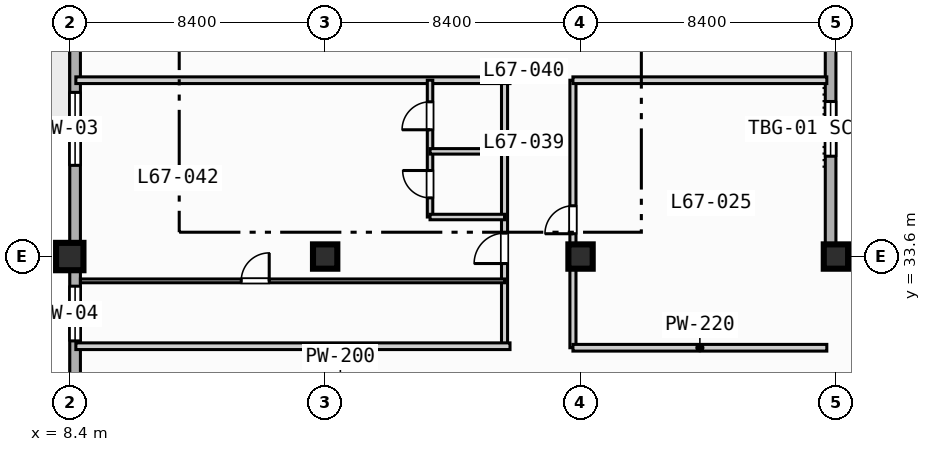
"""IFC4 building model, lengths in metres.
Left out: names, types, materials, properties, quantities, classifications, styles, units other than length and angle.
Written with IfcOpenShell. Run it as: python <this file> out.ifc"""

import sys

from ifc_helpers import new_model, si_unit, direction, frame, frame_2d, origin, origin_2d, place, context, subcontext, project, spatial, rectangle, extrude, element, fill, save


model = new_model("IFC4")
c1 = context("Model", 3, precision=1e-05, world=origin(), true_north=direction((0.0, 1.0)))
c2 = subcontext(c1, "Body", "Model", "MODEL_VIEW")
j1 = project(units=[si_unit("LENGTHUNIT", "METRE"), si_unit("PLANEANGLEUNIT", "RADIAN")], contexts=[c1])
p1 = place(None, origin())
s1 = spatial("IfcSite", under=j1, at=p1, CompositionType="ELEMENT")
p2 = place(p1, origin())
s2 = spatial("IfcBuilding", under=s1, at=p2, CompositionType="ELEMENT")
p3 = place(p2, frame((0.0, 0.0, 271.2)))
s3 = spatial("IfcBuildingStorey", under=s2, at=p3, CompositionType="ELEMENT", Elevation=271.2)
p4 = place(p3, frame((8.4, 33.6, 0.0), z_axis=(0.0, 0.0, 1.0), x_axis=(1.0, 0.0, 0.0)))
e1 = element("IfcColumn", 1, at=p4, inside=s3, PredefinedType="COLUMN", context=c2, shape_type="SweptSolid", body=[
    extrude(rectangle(XDim=0.9, YDim=0.9, at=origin_2d()), origin(), (0.0, 0.0, 1.0), 3.7),
])
for number, where, z_axis, x_axis in (
    (2, (16.8, 33.6, 0.0), (0.0, 0.0, 1.0), (1.0, 0.0, 0.0)),
    (3, (25.2, 33.6, 0.0), (0.0, 0.0, 1.0), (1.0, 0.0, 0.0)),
    (4, (33.6, 33.6, 0.0), (0.0, 0.0, 1.0), (1.0, 0.0, 0.0)),
):
    element("IfcColumn", number, at=place(p3, frame(where, z_axis=z_axis, x_axis=x_axis)), inside=s3, PredefinedType="COLUMN", context=c2, shape_type="SweptSolid", body=[
        extrude(rectangle(XDim=0.8, YDim=0.8, at=origin_2d()), origin(), (0.0, 0.0, 1.0), 3.7),
    ])
p5 = place(p3, frame((8.575, 11.575, 0.0), z_axis=(0.0, 0.0, 1.0), x_axis=(0.0, 1.0, 0.0)))
e5 = element("IfcWall", 5, at=p5, inside=s3, PredefinedType="STANDARD", context=c2, shape_type="SweptSolid", body=[
    extrude(rectangle(XDim=60.85, YDim=0.35, at=frame_2d((30.425, 0.0))), origin(), (0.0, 0.0, 1.0), 3.47),
])
p6 = place(p5, frame((33.925, 0.0, 0.0)))
e6 = element("IfcOpeningElement", 6, at=p6, cuts=e5, PredefinedType="OPENING", context=c2, shape_type="SweptSolid", body=[
    extrude(rectangle(XDim=1.4, YDim=2.2, at=frame_2d((0.7, 1.1))), frame((0.0, 0.185, 0.0), z_axis=(0.0, -1.0, 0.0), x_axis=(1.0, 0.0, 0.0)), (0.0, 0.0, 1.0), 0.37),
])
p7 = place(p5, frame((25.025, 0.0, 0.85)))
e7 = element("IfcOpeningElement", 7, at=p7, cuts=e5, PredefinedType="OPENING", context=c2, shape_type="SweptSolid", body=[
    extrude(rectangle(XDim=2.4, YDim=1.95, at=frame_2d((1.2, 0.975))), frame((0.0, 0.185, 0.0), z_axis=(0.0, -1.0, 0.0), x_axis=(1.0, 0.0, 0.0)), (0.0, 0.0, 1.0), 0.37),
])
p8 = place(p5, frame((41.825, 0.0, 0.85)))
e8 = element("IfcOpeningElement", 8, at=p8, cuts=e5, PredefinedType="OPENING", context=c2, shape_type="SweptSolid", body=[
    extrude(rectangle(XDim=2.4, YDim=1.95, at=frame_2d((1.2, 0.975))), frame((0.0, 0.185, 0.0), z_axis=(0.0, -1.0, 0.0), x_axis=(1.0, 0.0, 0.0)), (0.0, 0.0, 1.0), 0.37),
])
p9 = place(p5, frame((19.25, 0.0, 0.85)))
e9 = element("IfcOpeningElement", 9, at=p9, cuts=e5, PredefinedType="OPENING", context=c2, shape_type="SweptSolid", body=[
    extrude(rectangle(XDim=1.8, YDim=1.8, at=frame_2d((0.9, 0.9))), frame((0.0, 0.185, 0.0), z_axis=(0.0, -1.0, 0.0), x_axis=(1.0, 0.0, 0.0)), (0.0, 0.0, 1.0), 0.37),
])
p10 = place(p3, frame((33.425, 72.425, 0.0), z_axis=(0.0, 0.0, 1.0), x_axis=(0.0, -1.0, 0.0)))
e10 = element("IfcWall", 10, at=p10, inside=s3, PredefinedType="STANDARD", context=c2, shape_type="SweptSolid", body=[
    extrude(rectangle(XDim=39.0, YDim=0.35, at=frame_2d((19.5, 0.0))), origin(), (0.0, 0.0, 1.0), 3.47),
])
p11 = place(p10, frame((33.725, 0.0, 0.85)))
e11 = element("IfcOpeningElement", 11, at=p11, cuts=e10, PredefinedType="OPENING", context=c2, shape_type="SweptSolid", body=[
    extrude(rectangle(XDim=1.8, YDim=1.8, at=frame_2d((0.9, 0.9))), frame((0.0, 0.185, 0.0), z_axis=(0.0, -1.0, 0.0), x_axis=(1.0, 0.0, 0.0)), (0.0, 0.0, 1.0), 0.37),
])
p12 = place(p10, frame((8.225, 0.0, 0.85)))
e12 = element("IfcOpeningElement", 12, at=p12, cuts=e10, PredefinedType="OPENING", context=c2, shape_type="SweptSolid", body=[
    extrude(rectangle(XDim=2.4, YDim=1.95, at=frame_2d((1.2, 0.975))), frame((0.0, 0.185, 0.0), z_axis=(0.0, -1.0, 0.0), x_axis=(1.0, 0.0, 0.0)), (0.0, 0.0, 1.0), 0.37),
])
p13 = place(p3, frame((33.425, 33.425, 0.0), z_axis=(0.0, 0.0, 1.0), x_axis=(1.0, 0.0, 0.0)))
e13 = element("IfcWall", 13, at=p13, inside=s3, PredefinedType="STANDARD", context=c2, shape_type="SweptSolid", body=[
    extrude(rectangle(XDim=39.0, YDim=0.35, at=frame_2d((19.5, 0.0))), origin(), (0.0, 0.0, 1.0), 3.47),
])
p14 = place(p13, frame((12.075, 0.0, 0.0)))
e14 = element("IfcOpeningElement", 14, at=p14, cuts=e13, PredefinedType="OPENING", context=c2, shape_type="SweptSolid", body=[
    extrude(rectangle(XDim=1.4, YDim=2.2, at=frame_2d((0.7, 1.1))), frame((0.0, 0.185, 0.0), z_axis=(0.0, -1.0, 0.0), x_axis=(1.0, 0.0, 0.0)), (0.0, 0.0, 1.0), 0.37),
])
p15 = place(p3, frame((24.95, 30.6, 0.0), z_axis=(0.0, 0.0, 1.0), x_axis=(0.0, 1.0, 0.0)))
e15 = element("IfcWall", 15, at=p15, inside=s3, PredefinedType="PARTITIONING", context=c2, shape_type="SweptSolid", body=[
    extrude(rectangle(XDim=8.8, YDim=0.2, at=frame_2d((4.4, 0.0))), origin(), (0.0, 0.0, 1.0), 2.82),
])
p16 = place(p15, frame((3.75, 0.0, 0.0)))
e16 = element("IfcOpeningElement", 16, at=p16, cuts=e15, PredefinedType="OPENING", context=c2, shape_type="SweptSolid", body=[
    extrude(rectangle(XDim=0.92, YDim=2.1, at=frame_2d((0.46, 1.05))), frame((0.0, 0.11, 0.0), z_axis=(0.0, -1.0, 0.0), x_axis=(1.0, 0.0, 0.0)), (0.0, 0.0, 1.0), 0.22),
])
for number, where, z_axis, x_axis in (
    (17, (24.95, 30.6, 0.0), (0.0, 0.0, 1.0), (1.0, 0.0, 0.0)),
    (18, (24.95, 39.4, 0.0), (0.0, 0.0, 1.0), (1.0, 0.0, 0.0)),
):
    element("IfcWall", number, at=place(p3, frame(where, z_axis=z_axis, x_axis=x_axis)), inside=s3, PredefinedType="PARTITIONING", context=c2, shape_type="SweptSolid", body=[
        extrude(rectangle(XDim=8.35, YDim=0.22, at=frame_2d((4.175, 0.0))), origin(), (0.0, 0.0, 1.0), 3.47),
    ])
p17 = place(p3, frame((22.7, 30.65, 0.0), z_axis=(0.0, 0.0, 1.0), x_axis=(0.0, 1.0, 0.0)))
e19 = element("IfcWall", 19, at=p17, inside=s3, PredefinedType="PARTITIONING", context=c2, shape_type="SweptSolid", body=[
    extrude(rectangle(XDim=8.75, YDim=0.2, at=frame_2d((4.375, 0.0))), origin(), (0.0, 0.0, 1.0), 3.47),
])
p18 = place(p17, frame((2.72, 0.0, 0.0)))
e20 = element("IfcOpeningElement", 20, at=p18, cuts=e19, PredefinedType="OPENING", context=c2, shape_type="SweptSolid", body=[
    extrude(rectangle(XDim=1.0, YDim=2.15, at=frame_2d((0.5, 1.075))), frame((0.0, 0.11, 0.0), z_axis=(0.0, -1.0, 0.0), x_axis=(1.0, 0.0, 0.0)), (0.0, 0.0, 1.0), 0.22),
])
for number, where, z_axis, x_axis in (
    (21, (8.6, 30.65, 0.0), (0.0, 0.0, 1.0), (1.0, 0.0, 0.0)),
    (22, (8.6, 39.4, 0.0), (0.0, 0.0, 1.0), (1.0, 0.0, 0.0)),
):
    element("IfcWall", number, at=place(p3, frame(where, z_axis=z_axis, x_axis=x_axis)), inside=s3, PredefinedType="PARTITIONING", context=c2, shape_type="SweptSolid", body=[
        extrude(rectangle(XDim=14.28, YDim=0.22, at=frame_2d((7.14, 0.0))), origin(), (0.0, 0.0, 1.0), 3.47),
    ])
p19 = place(p3, frame((20.25, 34.9, 0.0), z_axis=(0.0, 0.0, 1.0), x_axis=(0.0, 1.0, 0.0)))
e23 = element("IfcWall", 23, at=p19, inside=s3, PredefinedType="PLUMBINGWALL", context=c2, shape_type="SweptSolid", body=[
    extrude(rectangle(XDim=4.5, YDim=0.18, at=frame_2d((2.25, 0.0))), origin(), (0.0, 0.0, 1.0), 3.47),
])
p20 = place(p19, frame((0.63, 0.0, 0.0)))
e24 = element("IfcOpeningElement", 24, at=p20, cuts=e23, PredefinedType="OPENING", context=c2, shape_type="SweptSolid", body=[
    extrude(rectangle(XDim=0.9, YDim=2.1, at=frame_2d((0.45, 1.05))), frame((0.0, 0.1, 0.0), z_axis=(0.0, -1.0, 0.0), x_axis=(1.0, 0.0, 0.0)), (0.0, 0.0, 1.0), 0.2),
])
p21 = place(p19, frame((2.87, 0.0, 0.0)))
e25 = element("IfcOpeningElement", 25, at=p21, cuts=e23, PredefinedType="OPENING", context=c2, shape_type="SweptSolid", body=[
    extrude(rectangle(XDim=0.92, YDim=2.1, at=frame_2d((0.46, 1.05))), frame((0.0, 0.1, 0.0), z_axis=(0.0, -1.0, 0.0), x_axis=(1.0, 0.0, 0.0)), (0.0, 0.0, 1.0), 0.2),
])
for number, where, z_axis, x_axis in (
    (26, (20.25, 34.9, 0.0), (0.0, 0.0, 1.0), (1.0, 0.0, 0.0)),
    (27, (20.25, 37.06, 0.0), (0.0, 0.0, 1.0), (1.0, 0.0, 0.0)),
):
    element("IfcWall", number, at=place(p3, frame(where, z_axis=z_axis, x_axis=x_axis)), inside=s3, PredefinedType="PLUMBINGWALL", context=c2, shape_type="SweptSolid", body=[
        extrude(rectangle(XDim=2.45, YDim=0.18, at=frame_2d((1.225, 0.0))), origin(), (0.0, 0.0, 1.0), 3.47),
    ])
p22 = place(p3, frame((8.75, 32.8, 0.0), z_axis=(0.0, 0.0, 1.0), x_axis=(1.0, 0.0, 0.0)))
e28 = element("IfcWall", 28, at=p22, inside=s3, PredefinedType="PARTITIONING", context=c2, shape_type="SweptSolid", body=[
    extrude(rectangle(XDim=13.95, YDim=0.125, at=frame_2d((6.975, 0.0))), origin(), (0.0, 0.0, 1.0), 3.47),
])
p23 = place(p22, frame((5.29, 0.0, 0.0)))
e29 = element("IfcOpeningElement", 29, at=p23, cuts=e28, PredefinedType="OPENING", context=c2, shape_type="SweptSolid", body=[
    extrude(rectangle(XDim=0.92, YDim=2.1, at=frame_2d((0.46, 1.05))), frame((0.0, 0.073, 0.0), z_axis=(0.0, -1.0, 0.0), x_axis=(1.0, 0.0, 0.0)), (0.0, 0.0, 1.0), 0.145),
])
p24 = place(p7, origin())
e30 = element("IfcWindow", 30, at=p24, inside=s3, PartitioningType="SINGLE_PANEL", PredefinedType="WINDOW", context=c2, shape_type="SweptSolid", body=[
    extrude(rectangle(XDim=2.4, YDim=1.95, at=frame_2d((1.2, 0.975))), frame((0.0, 0.03, 0.0), z_axis=(0.0, -1.0, 0.0), x_axis=(1.0, 0.0, 0.0)), (0.0, 0.0, 1.0), 0.06),
])
fill(e7, e30)
p25 = place(p9, origin())
e31 = element("IfcWindow", 31, at=p25, inside=s3, PartitioningType="SINGLE_PANEL", PredefinedType="WINDOW", context=c2, shape_type="SweptSolid", body=[
    extrude(rectangle(XDim=1.8, YDim=1.8, at=frame_2d((0.9, 0.9))), frame((0.0, 0.03, 0.0), z_axis=(0.0, -1.0, 0.0), x_axis=(1.0, 0.0, 0.0)), (0.0, 0.0, 1.0), 0.06),
])
fill(e9, e31)
p26 = place(p11, origin())
e32 = element("IfcWindow", 32, at=p26, inside=s3, PartitioningType="SINGLE_PANEL", PredefinedType="WINDOW", context=c2, shape_type="SweptSolid", body=[
    extrude(rectangle(XDim=1.8, YDim=1.8, at=frame_2d((0.9, 0.9))), frame((0.0, 0.03, 0.0), z_axis=(0.0, -1.0, 0.0), x_axis=(1.0, 0.0, 0.0)), (0.0, 0.0, 1.0), 0.06),
])
fill(e11, e32)
p27 = place(p16, origin())
e33 = element("IfcDoor", 33, at=p27, inside=s3, OperationType="SINGLE_SWING_LEFT", PredefinedType="DOOR", context=c2, shape_type="SweptSolid", body=[
    extrude(rectangle(XDim=0.92, YDim=2.1, at=frame_2d((0.46, 1.05))), frame((0.0, 0.025, 0.0), z_axis=(0.0, -1.0, 0.0), x_axis=(1.0, 0.0, 0.0)), (0.0, 0.0, 1.0), 0.05),
])
fill(e16, e33)
p28 = place(p18, origin())
e34 = element("IfcDoor", 34, at=p28, inside=s3, OperationType="SINGLE_SWING_LEFT", PredefinedType="DOOR", context=c2, shape_type="SweptSolid", body=[
    extrude(rectangle(XDim=1.0, YDim=2.15, at=frame_2d((0.5, 1.075))), frame((0.0, 0.025, 0.0), z_axis=(0.0, -1.0, 0.0), x_axis=(1.0, 0.0, 0.0)), (0.0, 0.0, 1.0), 0.05),
])
fill(e20, e34)
p29 = place(p20, origin())
e35 = element("IfcDoor", 35, at=p29, inside=s3, OperationType="SINGLE_SWING_RIGHT", PredefinedType="DOOR", context=c2, shape_type="SweptSolid", body=[
    extrude(rectangle(XDim=0.9, YDim=2.1, at=frame_2d((0.45, 1.05))), frame((0.0, 0.025, 0.0), z_axis=(0.0, -1.0, 0.0), x_axis=(1.0, 0.0, 0.0)), (0.0, 0.0, 1.0), 0.05),
])
fill(e24, e35)
p30 = place(p21, origin())
e36 = element("IfcDoor", 36, at=p30, inside=s3, OperationType="SINGLE_SWING_LEFT", PredefinedType="DOOR", context=c2, shape_type="SweptSolid", body=[
    extrude(rectangle(XDim=0.92, YDim=2.1, at=frame_2d((0.46, 1.05))), frame((0.0, 0.025, 0.0), z_axis=(0.0, -1.0, 0.0), x_axis=(1.0, 0.0, 0.0)), (0.0, 0.0, 1.0), 0.05),
])
fill(e25, e36)
p31 = place(p23, origin())
e37 = element("IfcDoor", 37, at=p31, inside=s3, OperationType="SINGLE_SWING_RIGHT", PredefinedType="DOOR", context=c2, shape_type="SweptSolid", body=[
    extrude(rectangle(XDim=0.92, YDim=2.1, at=frame_2d((0.46, 1.05))), frame((0.0, 0.025, 0.0), z_axis=(0.0, -1.0, 0.0), x_axis=(1.0, 0.0, 0.0)), (0.0, 0.0, 1.0), 0.05),
])
fill(e29, e37)
save(model, sys.argv[1])
